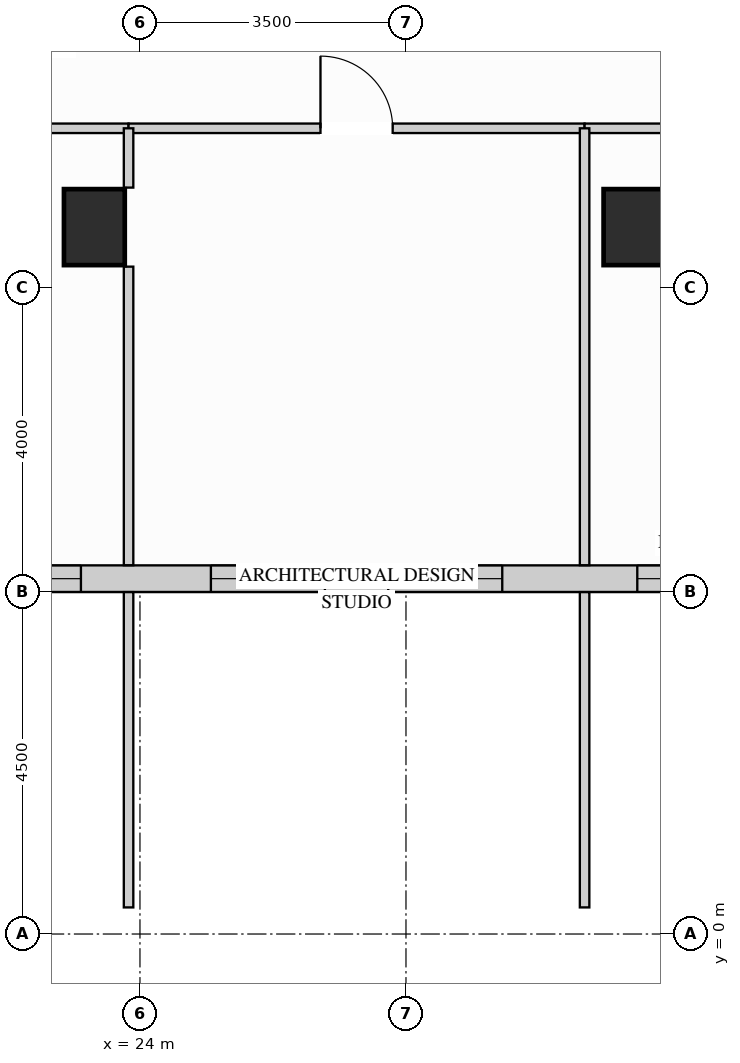
"""IFC4 building model, lengths in metres.
Left out: names, types, materials, properties, quantities, classifications, styles, units other than length and angle.
Written with IfcOpenShell. Run it as: python <this file> out.ifc"""

import sys

from ifc_helpers import new_model, si_unit, direction, frame, frame_2d, origin, origin_2d, place, context, subcontext, project, spatial, rectangle, extrude, source, transform, mapped, element, fill, save


model = new_model("IFC4")
c1 = context("Model", 3, precision=1e-05, world=origin(), true_north=direction((0.0, 1.0)))
c2 = subcontext(c1, "Body", "Model", "MODEL_VIEW")
j1 = project(units=[si_unit("LENGTHUNIT", "METRE"), si_unit("PLANEANGLEUNIT", "RADIAN")], contexts=[c1])
p1 = place(None, origin())
s1 = spatial("IfcSite", under=j1, at=p1, CompositionType="ELEMENT")
p2 = place(p1, origin())
s2 = spatial("IfcBuilding", under=s1, at=p2, CompositionType="ELEMENT")
p3 = place(p2, frame((0.0, 0.0, 150.3)))
s3 = spatial("IfcBuildingStorey", under=s2, at=p3, CompositionType="ELEMENT", Elevation=150.3)
m1 = source(origin(), c2, "Body", "SweptSolid", [
    extrude(rectangle(XDim=0.8, YDim=1.0, at=origin_2d()), origin(), (0.0, 0.0, 1.0), 3.4),
])
for number, where, z_axis, x_axis in (
    (1, (23.4, 9.3, 0.0), (0.0, 0.0, 1.0), (1.0, 0.0, 0.0)),
    (2, (30.5, 9.3, 0.0), (0.0, 0.0, 1.0), (1.0, 0.0, 0.0)),
):
    element("IfcColumn", number, at=place(p3, frame(where, z_axis=z_axis, x_axis=x_axis)), inside=s3, PredefinedType="COLUMN", context=c2, shape_type="MappedRepresentation", body=[
        mapped(m1, transform((0.0, 0.0, 0.0), x_axis=(1.0, 0.0, 0.0), y_axis=(0.0, 1.0, 0.0), z_axis=(0.0, 0.0, 1.0))),
    ])
p4 = place(p3, frame((19.15, 4.675, 0.0), z_axis=(0.0, 0.0, 1.0), x_axis=(1.0, 0.0, 0.0)))
e3 = element("IfcWall", 3, at=p4, inside=s3, PredefinedType="SOLIDWALL", context=c2, shape_type="SweptSolid", body=[
    extrude(rectangle(XDim=15.6, YDim=0.35, at=frame_2d((7.8, 0.0))), origin(), (0.0, 0.0, 1.0), 3.385),
])
p5 = place(p4, frame((0.697, 0.0, 0.78)))
e4 = element("IfcOpeningElement", 4, at=p5, cuts=e3, PredefinedType="OPENING", context=c2, shape_type="SweptSolid", body=[
    extrude(rectangle(XDim=1.5, YDim=2.0, at=frame_2d((0.75, 1.0))), frame((0.0, 0.185, 0.0), z_axis=(0.0, -1.0, 0.0), x_axis=(1.0, 0.0, 0.0)), (0.0, 0.0, 1.0), 0.37),
])
p6 = place(p4, frame((2.573, 0.0, 0.78)))
e5 = element("IfcOpeningElement", 5, at=p6, cuts=e3, PredefinedType="OPENING", context=c2, shape_type="SweptSolid", body=[
    extrude(rectangle(XDim=1.5, YDim=2.0, at=frame_2d((0.75, 1.0))), frame((0.0, 0.185, 0.0), z_axis=(0.0, -1.0, 0.0), x_axis=(1.0, 0.0, 0.0)), (0.0, 0.0, 1.0), 0.37),
])
p7 = place(p4, frame((5.783, 0.0, 0.78)))
e6 = element("IfcOpeningElement", 6, at=p7, cuts=e3, PredefinedType="OPENING", context=c2, shape_type="SweptSolid", body=[
    extrude(rectangle(XDim=1.5, YDim=2.0, at=frame_2d((0.75, 1.0))), frame((0.0, 0.185, 0.0), z_axis=(0.0, -1.0, 0.0), x_axis=(1.0, 0.0, 0.0)), (0.0, 0.0, 1.0), 0.37),
])
p8 = place(p4, frame((8.117, 0.0, 0.78)))
e7 = element("IfcOpeningElement", 7, at=p8, cuts=e3, PredefinedType="OPENING", context=c2, shape_type="SweptSolid", body=[
    extrude(rectangle(XDim=1.5, YDim=2.0, at=frame_2d((0.75, 1.0))), frame((0.0, 0.185, 0.0), z_axis=(0.0, -1.0, 0.0), x_axis=(1.0, 0.0, 0.0)), (0.0, 0.0, 1.0), 0.37),
])
p9 = place(p4, frame((11.393, 0.0, 0.78)))
e8 = element("IfcOpeningElement", 8, at=p9, cuts=e3, PredefinedType="OPENING", context=c2, shape_type="SweptSolid", body=[
    extrude(rectangle(XDim=1.5, YDim=2.0, at=frame_2d((0.75, 1.0))), frame((0.0, 0.185, 0.0), z_axis=(0.0, -1.0, 0.0), x_axis=(1.0, 0.0, 0.0)), (0.0, 0.0, 1.0), 0.37),
])
p10 = place(p4, frame((13.337, 0.0, 0.78)))
e9 = element("IfcOpeningElement", 9, at=p10, cuts=e3, PredefinedType="OPENING", context=c2, shape_type="SweptSolid", body=[
    extrude(rectangle(XDim=1.5, YDim=2.0, at=frame_2d((0.75, 1.0))), frame((0.0, 0.185, 0.0), z_axis=(0.0, -1.0, 0.0), x_axis=(1.0, 0.0, 0.0)), (0.0, 0.0, 1.0), 0.37),
])
p11 = place(p3, frame((19.5, 10.6, 0.0), z_axis=(0.0, 0.0, 1.0), x_axis=(1.0, 0.0, 0.0)))
e10 = element("IfcWall", 10, at=p11, inside=s3, PredefinedType="PARTITIONING", context=c2, shape_type="SweptSolid", body=[
    extrude(rectangle(XDim=4.35, YDim=0.125, at=frame_2d((2.175, 0.0))), origin(), (0.0, 0.0, 1.0), 3.385),
])
p12 = place(p11, frame((1.7, 0.0, 0.0)))
e11 = element("IfcOpeningElement", 11, at=p12, cuts=e10, PredefinedType="OPENING", context=c2, shape_type="SweptSolid", body=[
    extrude(rectangle(XDim=0.95, YDim=2.15, at=frame_2d((0.475, 1.075))), frame((0.0, 0.073, 0.0), z_axis=(0.0, -1.0, 0.0), x_axis=(1.0, 0.0, 0.0)), (0.0, 0.0, 1.0), 0.145),
])
p13 = place(p3, frame((23.85, 10.6, 0.0), z_axis=(0.0, 0.0, 1.0), x_axis=(1.0, 0.0, 0.0)))
e12 = element("IfcWall", 12, at=p13, inside=s3, PredefinedType="PARTITIONING", context=c2, shape_type="SweptSolid", body=[
    extrude(rectangle(XDim=6.0, YDim=0.125, at=frame_2d((3.0, 0.0))), origin(), (0.0, 0.0, 1.0), 3.385),
])
p14 = place(p13, frame((2.525, 0.0, 0.0)))
e13 = element("IfcOpeningElement", 13, at=p14, cuts=e12, PredefinedType="OPENING", context=c2, shape_type="SweptSolid", body=[
    extrude(rectangle(XDim=0.95, YDim=2.15, at=frame_2d((0.475, 1.075))), frame((0.0, 0.073, 0.0), z_axis=(0.0, -1.0, 0.0), x_axis=(1.0, 0.0, 0.0)), (0.0, 0.0, 1.0), 0.145),
])
p15 = place(p3, frame((29.85, 10.6, 0.0), z_axis=(0.0, 0.0, 1.0), x_axis=(1.0, 0.0, 0.0)))
e14 = element("IfcWall", 14, at=p15, inside=s3, PredefinedType="PARTITIONING", context=c2, shape_type="SweptSolid", body=[
    extrude(rectangle(XDim=4.55, YDim=0.125, at=frame_2d((2.275, 0.0))), origin(), (0.0, 0.0, 1.0), 3.385),
])
p16 = place(p15, frame((1.8, 0.0, 0.0)))
e15 = element("IfcOpeningElement", 15, at=p16, cuts=e14, PredefinedType="OPENING", context=c2, shape_type="SweptSolid", body=[
    extrude(rectangle(XDim=0.95, YDim=2.15, at=frame_2d((0.475, 1.075))), frame((0.0, 0.073, 0.0), z_axis=(0.0, -1.0, 0.0), x_axis=(1.0, 0.0, 0.0)), (0.0, 0.0, 1.0), 0.145),
])
m2 = source(origin(), c2, "Body", "SweptSolid", [
    extrude(rectangle(XDim=4.148, YDim=0.125, at=frame_2d((2.074, 0.0))), origin(), (0.0, 0.0, 1.0), 3.385),
])
p17 = place(p3, frame((23.85, 0.35, 0.0), z_axis=(0.0, 0.0, 1.0), x_axis=(0.0, 1.0, 0.0)))
e16 = element("IfcWall", 16, at=p17, inside=s3, PredefinedType="PARTITIONING", context=c2, shape_type="MappedRepresentation", body=[
    mapped(m2, transform((0.0, 0.0, 0.0), x_axis=(1.0, 0.0, 0.0), y_axis=(0.0, 1.0, 0.0), z_axis=(0.0, 0.0, 1.0))),
])
m3 = source(origin(), c2, "Body", "SweptSolid", [
    extrude(rectangle(XDim=3.928, YDim=0.125, at=frame_2d((1.964, 0.0))), origin(), (0.0, 0.0, 1.0), 3.385),
])
p18 = place(p3, frame((23.85, 4.852, 0.0), z_axis=(0.0, 0.0, 1.0), x_axis=(0.0, 1.0, 0.0)))
e17 = element("IfcWall", 17, at=p18, inside=s3, PredefinedType="PARTITIONING", context=c2, shape_type="MappedRepresentation", body=[
    mapped(m3, transform((0.0, 0.0, 0.0), x_axis=(1.0, 0.0, 0.0), y_axis=(0.0, 1.0, 0.0), z_axis=(0.0, 0.0, 1.0))),
])
m4 = source(origin(), c2, "Body", "SweptSolid", [
    extrude(rectangle(XDim=0.78, YDim=0.125, at=frame_2d((0.39, 0.0))), origin(), (0.0, 0.0, 1.0), 3.385),
])
p19 = place(p3, frame((23.85, 9.82, 0.0), z_axis=(0.0, 0.0, 1.0), x_axis=(0.0, 1.0, 0.0)))
e18 = element("IfcWall", 18, at=p19, inside=s3, PredefinedType="PARTITIONING", context=c2, shape_type="MappedRepresentation", body=[
    mapped(m4, transform((0.0, 0.0, 0.0), x_axis=(1.0, 0.0, 0.0), y_axis=(0.0, 1.0, 0.0), z_axis=(0.0, 0.0, 1.0))),
])
p20 = place(p3, frame((29.85, 0.35, 0.0), z_axis=(0.0, 0.0, 1.0), x_axis=(0.0, 1.0, 0.0)))
e19 = element("IfcWall", 19, at=p20, inside=s3, PredefinedType="PARTITIONING", context=c2, shape_type="MappedRepresentation", body=[
    mapped(m2, transform((0.0, 0.0, 0.0), x_axis=(1.0, 0.0, 0.0), y_axis=(0.0, 1.0, 0.0), z_axis=(0.0, 0.0, 1.0))),
])
m5 = source(origin(), c2, "Body", "SweptSolid", [
    extrude(rectangle(XDim=5.748, YDim=0.125, at=frame_2d((2.874, 0.0))), origin(), (0.0, 0.0, 1.0), 3.385),
])
p21 = place(p3, frame((29.85, 4.852, 0.0), z_axis=(0.0, 0.0, 1.0), x_axis=(0.0, 1.0, 0.0)))
e20 = element("IfcWall", 20, at=p21, inside=s3, PredefinedType="PARTITIONING", context=c2, shape_type="MappedRepresentation", body=[
    mapped(m5, transform((0.0, 0.0, 0.0), x_axis=(1.0, 0.0, 0.0), y_axis=(0.0, 1.0, 0.0), z_axis=(0.0, 0.0, 1.0))),
])
m6 = source(origin(), c2, "Body", "SweptSolid", [
    extrude(rectangle(XDim=0.95, YDim=2.15, at=frame_2d((0.475, 1.075))), frame((0.0, 0.025, 0.0), z_axis=(0.0, -1.0, 0.0), x_axis=(1.0, 0.0, 0.0)), (0.0, 0.0, 1.0), 0.05),
])
p22 = place(p14, origin())
e21 = element("IfcDoor", 21, at=p22, inside=s3, OperationType="SINGLE_SWING_LEFT", PredefinedType="DOOR", context=c2, shape_type="MappedRepresentation", body=[
    mapped(m6, transform((0.0, 0.0, 0.0), x_axis=(1.0, 0.0, 0.0), y_axis=(0.0, 1.0, 0.0), z_axis=(0.0, 0.0, 1.0))),
])
fill(e13, e21)
m7 = source(origin(), c2, "Body", "SweptSolid", [
    extrude(rectangle(XDim=1.5, YDim=2.0, at=frame_2d((0.75, 1.0))), frame((0.0, 0.03, 0.0), z_axis=(0.0, -1.0, 0.0), x_axis=(1.0, 0.0, 0.0)), (0.0, 0.0, 1.0), 0.06),
])
p23 = place(p6, origin())
e22 = element("IfcWindow", 22, at=p23, inside=s3, PartitioningType="SINGLE_PANEL", PredefinedType="WINDOW", context=c2, shape_type="MappedRepresentation", body=[
    mapped(m7, transform((0.0, 0.0, 0.0), x_axis=(1.0, 0.0, 0.0), y_axis=(0.0, 1.0, 0.0), z_axis=(0.0, 0.0, 1.0))),
])
fill(e5, e22)
p24 = place(p7, origin())
e23 = element("IfcWindow", 23, at=p24, inside=s3, PartitioningType="SINGLE_PANEL", PredefinedType="WINDOW", context=c2, shape_type="MappedRepresentation", body=[
    mapped(m7, transform((0.0, 0.0, 0.0), x_axis=(1.0, 0.0, 0.0), y_axis=(0.0, 1.0, 0.0), z_axis=(0.0, 0.0, 1.0))),
])
fill(e6, e23)
p25 = place(p8, origin())
e24 = element("IfcWindow", 24, at=p25, inside=s3, PartitioningType="SINGLE_PANEL", PredefinedType="WINDOW", context=c2, shape_type="MappedRepresentation", body=[
    mapped(m7, transform((0.0, 0.0, 0.0), x_axis=(1.0, 0.0, 0.0), y_axis=(0.0, 1.0, 0.0), z_axis=(0.0, 0.0, 1.0))),
])
fill(e7, e24)
p26 = place(p9, origin())
e25 = element("IfcWindow", 25, at=p26, inside=s3, PartitioningType="SINGLE_PANEL", PredefinedType="WINDOW", context=c2, shape_type="MappedRepresentation", body=[
    mapped(m7, transform((0.0, 0.0, 0.0), x_axis=(1.0, 0.0, 0.0), y_axis=(0.0, 1.0, 0.0), z_axis=(0.0, 0.0, 1.0))),
])
fill(e8, e25)
save(model, sys.argv[1])
